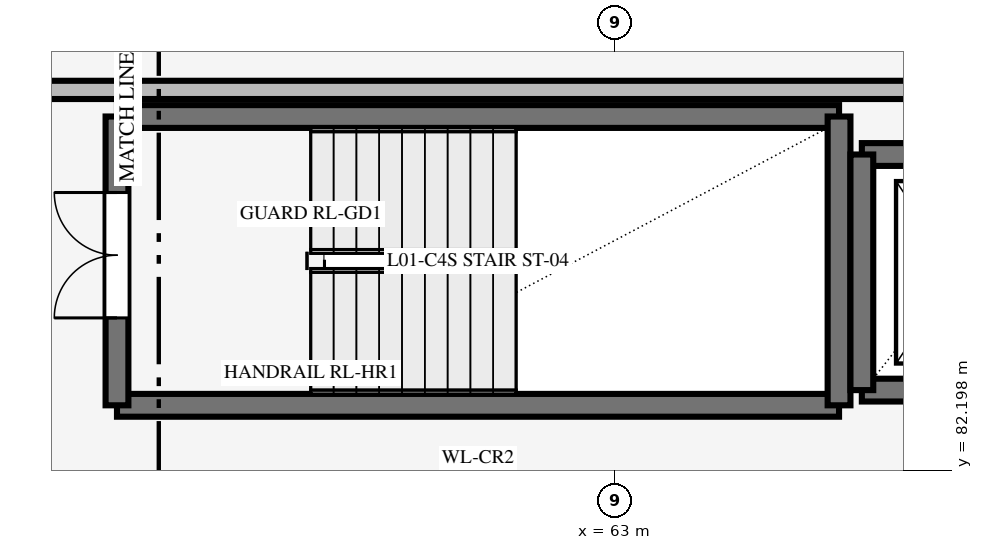
"""IFC4 building model, lengths in metres.
Left out: names, types, materials, properties, quantities, classifications, styles, units other than length and angle.
Written with IfcOpenShell. Run it as: python <this file> out.ifc"""

import sys

from ifc_helpers import new_model, si_unit, direction, frame, frame_2d, origin, place, context, subcontext, project, spatial, rectangle, extrude, element, fill, save


model = new_model("IFC4")
c1 = context("Model", 3, precision=1e-05, world=origin(), true_north=direction((0.0, 1.0)))
c2 = subcontext(c1, "Body", "Model", "MODEL_VIEW")
j1 = project(units=[si_unit("LENGTHUNIT", "METRE"), si_unit("PLANEANGLEUNIT", "RADIAN")], contexts=[c1])
p1 = place(None, origin())
s1 = spatial("IfcSite", under=j1, at=p1, CompositionType="ELEMENT")
p2 = place(p1, origin())
s2 = spatial("IfcBuilding", under=s1, at=p2, CompositionType="ELEMENT")
p3 = place(p2, frame((0.0, 0.0, 6.0)))
s3 = spatial("IfcBuildingStorey", under=s2, at=p3, CompositionType="ELEMENT", Elevation=6.0)
for number, where, z_axis, x_axis in (
    (1, (65.95, 83.05, 0.0), (0.0, 0.0, 1.0), (-1.0, 0.0, 0.0)),
    (2, (56.45, 86.85, 0.0), (0.0, 0.0, 1.0), (1.0, 0.0, 0.0)),
):
    element("IfcWall", number, at=place(p3, frame(where, z_axis=z_axis, x_axis=x_axis)), inside=s3, PredefinedType="SHEAR", context=c2, shape_type="SweptSolid", body=[
        extrude(rectangle(XDim=9.5, YDim=0.3, at=frame_2d((4.75, 0.0))), origin(), (0.0, 0.0, 1.0), 6.0),
    ])
p4 = place(p3, frame((56.45, 83.05, 0.0), z_axis=(0.0, 0.0, 1.0), x_axis=(0.0, 1.0, 0.0)))
e3 = element("IfcWall", 3, at=p4, inside=s3, PredefinedType="SHEAR", context=c2, shape_type="SweptSolid", body=[
    extrude(rectangle(XDim=3.8, YDim=0.3, at=frame_2d((1.9, 0.0))), origin(), (0.0, 0.0, 1.0), 6.0),
])
p5 = place(p4, frame((1.15, 0.0, 0.0)))
e4 = element("IfcOpeningElement", 4, at=p5, cuts=e3, PredefinedType="OPENING", context=c2, shape_type="SweptSolid", body=[
    extrude(rectangle(XDim=1.65, YDim=2.2, at=frame_2d((0.825, 1.1))), frame((0.0, 0.16, 0.0), z_axis=(0.0, -1.0, 0.0), x_axis=(1.0, 0.0, 0.0)), (0.0, 0.0, 1.0), 0.32),
])
p6 = place(p3, frame((65.95, 83.05, 0.0), z_axis=(0.0, 0.0, 1.0), x_axis=(0.0, 1.0, 0.0)))
e5 = element("IfcWall", 5, at=p6, inside=s3, PredefinedType="SHEAR", context=c2, shape_type="SweptSolid", body=[
    extrude(rectangle(XDim=3.8, YDim=0.3, at=frame_2d((1.9, 0.0))), origin(), (0.0, 0.0, 1.0), 6.0),
])
p7 = place(p3, frame((66.25, 83.25, 0.0), z_axis=(0.0, 0.0, 1.0), x_axis=(1.0, 0.0, 0.0)))
e6 = element("IfcWall", 6, at=p7, inside=s3, PredefinedType="SHEAR", context=c2, shape_type="SweptSolid", body=[
    extrude(rectangle(XDim=2.5, YDim=0.3, at=frame_2d((1.25, 0.0))), origin(), (0.0, 0.0, 1.0), 5.64),
])
p8 = place(p7, frame((0.6, 0.0, 0.0)))
e7 = element("IfcOpeningElement", 7, at=p8, cuts=e6, PredefinedType="OPENING", context=c2, shape_type="SweptSolid", body=[
    extrude(rectangle(XDim=1.3, YDim=2.2, at=frame_2d((0.65, 1.1))), frame((0.0, 0.16, 0.0), z_axis=(0.0, -1.0, 0.0), x_axis=(1.0, 0.0, 0.0)), (0.0, 0.0, 1.0), 0.32),
])
p9 = place(p3, frame((66.25, 86.35, 0.0), z_axis=(0.0, 0.0, 1.0), x_axis=(1.0, 0.0, 0.0)))
e8 = element("IfcWall", 8, at=p9, inside=s3, PredefinedType="SHEAR", context=c2, shape_type="SweptSolid", body=[
    extrude(rectangle(XDim=2.5, YDim=0.3, at=frame_2d((1.25, 0.0))), origin(), (0.0, 0.0, 1.0), 5.64),
])
p10 = place(p3, frame((66.25, 83.25, 0.0), z_axis=(0.0, 0.0, 1.0), x_axis=(0.0, 1.0, 0.0)))
e9 = element("IfcWall", 9, at=p10, inside=s3, PredefinedType="SHEAR", context=c2, shape_type="SweptSolid", body=[
    extrude(rectangle(XDim=3.1, YDim=0.3, at=frame_2d((1.55, 0.0))), origin(), (0.0, 0.0, 1.0), 5.64),
])
p11 = place(p3, frame((54.64, 87.2, 0.0), z_axis=(0.0, 0.0, 1.0), x_axis=(1.0, 0.0, 0.0)))
e10 = element("IfcWall", 10, at=p11, inside=s3, PredefinedType="STANDARD", context=c2, shape_type="SweptSolid", body=[
    extrude(rectangle(XDim=15.96, YDim=0.24, at=frame_2d((7.98, 0.0))), origin(), (0.0, 0.0, 1.0), 3.15),
])
p12 = place(p5, origin())
e11 = element("IfcDoor", 11, at=p12, inside=s3, OperationType="DOUBLE_DOOR_SINGLE_SWING", PredefinedType="DOOR", context=c2, shape_type="SweptSolid", body=[
    extrude(rectangle(XDim=1.65, YDim=2.2, at=frame_2d((0.825, 1.1))), frame((0.0, 0.025, 0.0), z_axis=(0.0, -1.0, 0.0), x_axis=(1.0, 0.0, 0.0)), (0.0, 0.0, 1.0), 0.05),
])
fill(e4, e11)
save(model, sys.argv[1])
